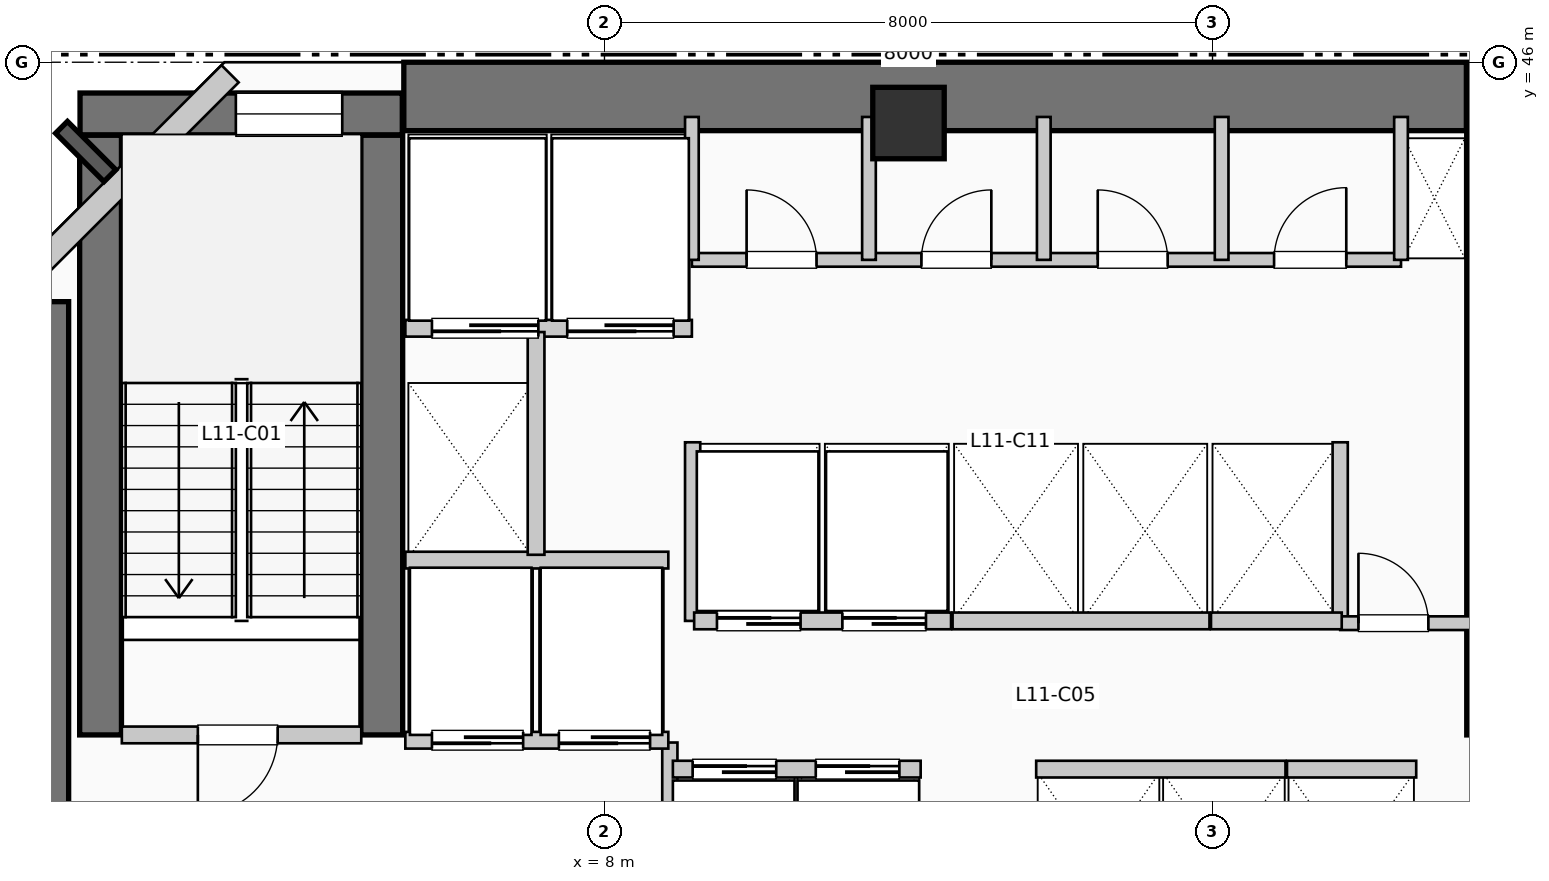
"""IFC4 building model, lengths in metres.
Left out: names, types, materials, properties, quantities, classifications, styles, units other than length and angle.
Written with IfcOpenShell. Run it as: python <this file> out.ifc"""

import sys

from ifc_helpers import new_model, si_unit, direction, frame, frame_2d, origin, origin_2d, place, context, subcontext, project, spatial, rectangle, extrude, element, fill, save


model = new_model("IFC4")
c1 = context("Model", 3, precision=1e-05, world=origin(), true_north=direction((0.0, 1.0)))
c2 = subcontext(c1, "Body", "Model", "MODEL_VIEW")
j1 = project(units=[si_unit("LENGTHUNIT", "METRE"), si_unit("PLANEANGLEUNIT", "RADIAN")], contexts=[c1])
p1 = place(None, origin())
s1 = spatial("IfcSite", under=j1, at=p1, CompositionType="ELEMENT")
p2 = place(p1, origin())
s2 = spatial("IfcBuilding", under=s1, at=p2, CompositionType="ELEMENT")
p3 = place(p2, frame((0.0, 0.0, 50.16)))
s3 = spatial("IfcBuildingStorey", under=s2, at=p3, CompositionType="ELEMENT", Elevation=50.16)
p4 = place(p3, frame((5.36, 45.55, 0.0), z_axis=(0.0, 0.0, 1.0), x_axis=(1.0, 0.0, 0.0)))
e1 = element("IfcWall", 1, at=p4, inside=s3, PredefinedType="SHEAR", context=c2, shape_type="SweptSolid", body=[
    extrude(rectangle(XDim=13.98, YDim=0.9, at=frame_2d((6.99, 0.0))), origin(), (0.0, 0.0, 1.0), 3.96),
])
p5 = place(p3, frame((0.5, 34.95, 0.0), z_axis=(0.0, 0.0, 1.0), x_axis=(0.0, 1.0, 0.0)))
e2 = element("IfcWall", 2, at=p5, inside=s3, PredefinedType="SHEAR", context=c2, shape_type="SweptSolid", body=[
    extrude(rectangle(XDim=7.9, YDim=0.9, at=frame_2d((3.95, 0.0))), origin(), (0.0, 0.0, 1.0), 3.96),
])
for number, where, z_axis, x_axis in (
    (3, (1.37, 37.15, 0.0), (0.0, 0.0, 1.0), (0.0, 1.0, 0.0)),
    (4, (5.07, 37.15, 0.0), (0.0, 0.0, 1.0), (0.0, 1.0, 0.0)),
):
    element("IfcWall", number, at=place(p3, frame(where, z_axis=z_axis, x_axis=x_axis)), inside=s3, PredefinedType="SHEAR", context=c2, shape_type="SweptSolid", body=[
        extrude(rectangle(XDim=7.89, YDim=0.55, at=frame_2d((3.945, 0.0))), origin(), (0.0, 0.0, 1.0), 3.96),
    ])
p6 = place(p3, frame((1.1, 45.32, 0.0), z_axis=(0.0, 0.0, 1.0), x_axis=(1.0, 0.0, 0.0)))
e5 = element("IfcWall", 5, at=p6, inside=s3, PredefinedType="SHEAR", context=c2, shape_type="SweptSolid", body=[
    extrude(rectangle(XDim=4.24, YDim=0.55, at=frame_2d((2.12, 0.0))), origin(), (0.0, 0.0, 1.0), 3.96),
])
p7 = place(p6, frame((2.05, 0.0, 1.05)))
e6 = element("IfcOpeningElement", 6, at=p7, cuts=e5, PredefinedType="OPENING", context=c2, shape_type="SweptSolid", body=[
    extrude(rectangle(XDim=1.4, YDim=1.8, at=frame_2d((0.7, 0.9))), frame((0.0, 0.285, 0.0), z_axis=(0.0, -1.0, 0.0), x_axis=(1.0, 0.0, 0.0)), (0.0, 0.0, 1.0), 0.57),
])
p8 = place(p3, frame((19.62, 37.15, 0.0), z_axis=(0.0, 0.0, 1.0), x_axis=(0.0, 1.0, 0.0)))
e7 = element("IfcWall", 7, at=p8, inside=s3, PredefinedType="SHEAR", context=c2, shape_type="SweptSolid", body=[
    extrude(rectangle(XDim=7.89, YDim=0.55, at=frame_2d((3.945, 0.0))), origin(), (0.0, 0.0, 1.0), 3.96),
])
p9 = place(p3, frame((19.35, 45.32, 0.0), z_axis=(0.0, 0.0, 1.0), x_axis=(1.0, 0.0, 0.0)))
e8 = element("IfcWall", 8, at=p9, inside=s3, PredefinedType="SHEAR", context=c2, shape_type="SweptSolid", body=[
    extrude(rectangle(XDim=3.69, YDim=0.55, at=frame_2d((1.845, 0.0))), origin(), (0.0, 0.0, 1.0), 3.96),
])
p10 = place(p9, frame((1.15, 0.0, 1.05)))
e9 = element("IfcOpeningElement", 9, at=p10, cuts=e8, PredefinedType="OPENING", context=c2, shape_type="SweptSolid", body=[
    extrude(rectangle(XDim=1.4, YDim=1.8, at=frame_2d((0.7, 0.9))), frame((0.0, 0.285, 0.0), z_axis=(0.0, -1.0, 0.0), x_axis=(1.0, 0.0, 0.0)), (0.0, 0.0, 1.0), 0.57),
])
p11 = place(p3, frame((12.0, 45.2, 0.0), z_axis=(0.0, 0.0, 1.0), x_axis=(1.0, 0.0, 0.0)))
e10 = element("IfcColumn", 10, at=p11, inside=s3, PredefinedType="COLUMN", context=c2, shape_type="SweptSolid", body=[
    extrude(rectangle(XDim=0.94, YDim=0.94, at=origin_2d()), origin(), (0.0, 0.0, 1.0), 3.96),
])
p12 = place(p3, frame((3.074, 45.848, 0.0), z_axis=(0.0, 0.0, 1.0), x_axis=(-0.707106781187, -0.707106781187, 0.0)))
e11 = element("IfcWall", 11, at=p12, inside=s3, PredefinedType="SOLIDWALL", context=c2, shape_type="SweptSolid", body=[
    extrude(rectangle(XDim=4.133, YDim=0.32, at=frame_2d((2.066, 0.0))), origin(), (0.0, 0.0, 1.0), 3.71),
])
p13 = place(p3, frame((1.65, 37.15, 0.0), z_axis=(0.0, 0.0, 1.0), x_axis=(1.0, 0.0, 0.0)))
e12 = element("IfcWall", 12, at=p13, inside=s3, PredefinedType="PARTITIONING", context=c2, shape_type="SweptSolid", body=[
    extrude(rectangle(XDim=3.15, YDim=0.22, at=frame_2d((1.575, 0.0))), origin(), (0.0, 0.0, 1.0), 3.71),
])
p14 = place(p13, frame((2.05, 0.0, 0.0), z_axis=(0.0, 0.0, 1.0), x_axis=(-1.0, 0.0, 0.0)))
e13 = element("IfcOpeningElement", 13, at=p14, cuts=e12, PredefinedType="OPENING", context=c2, shape_type="SweptSolid", body=[
    extrude(rectangle(XDim=1.05, YDim=2.15, at=frame_2d((0.525, 1.075))), frame((0.0, 0.12, 0.0), z_axis=(0.0, -1.0, 0.0), x_axis=(1.0, 0.0, 0.0)), (0.0, 0.0, 1.0), 0.24),
])
p15 = place(p3, frame((8.86, 34.55, 0.0), z_axis=(0.0, 0.0, 1.0), x_axis=(0.0, 1.0, 0.0)))
e14 = element("IfcWall", 14, at=p15, inside=s3, PredefinedType="PARTITIONING", context=c2, shape_type="SweptSolid", body=[
    extrude(rectangle(XDim=2.5, YDim=0.2, at=frame_2d((1.25, 0.0))), origin(), (0.0, 0.0, 1.0), 3.71),
])
p16 = place(p3, frame((5.38, 37.08, 0.0), z_axis=(0.0, 0.0, 1.0), x_axis=(1.0, 0.0, 0.0)))
e15 = element("IfcWall", 15, at=p16, inside=s3, PredefinedType="PARTITIONING", context=c2, shape_type="SweptSolid", body=[
    extrude(rectangle(XDim=3.46, YDim=0.22, at=frame_2d((1.73, 0.0))), origin(), (0.0, 0.0, 1.0), 3.71),
])
p17 = place(p16, frame((1.55, 0.0, 0.0), z_axis=(0.0, 0.0, 1.0), x_axis=(-1.0, 0.0, 0.0)))
e16 = element("IfcOpeningElement", 16, at=p17, cuts=e15, PredefinedType="OPENING", context=c2, shape_type="SweptSolid", body=[
    extrude(rectangle(XDim=1.2, YDim=2.2, at=frame_2d((0.6, 1.1))), frame((0.0, 0.12, 0.0), z_axis=(0.0, -1.0, 0.0), x_axis=(1.0, 0.0, 0.0)), (0.0, 0.0, 1.0), 0.24),
])
p18 = place(p16, frame((3.22, 0.0, 0.0), z_axis=(0.0, 0.0, 1.0), x_axis=(-1.0, 0.0, 0.0)))
e17 = element("IfcOpeningElement", 17, at=p18, cuts=e15, PredefinedType="OPENING", context=c2, shape_type="SweptSolid", body=[
    extrude(rectangle(XDim=1.2, YDim=2.2, at=frame_2d((0.6, 1.1))), frame((0.0, 0.12, 0.0), z_axis=(0.0, -1.0, 0.0), x_axis=(1.0, 0.0, 0.0)), (0.0, 0.0, 1.0), 0.24),
])
p19 = place(p3, frame((5.38, 39.45, 0.0), z_axis=(0.0, 0.0, 1.0), x_axis=(1.0, 0.0, 0.0)))
e18 = element("IfcWall", 18, at=p19, inside=s3, PredefinedType="PARTITIONING", context=c2, shape_type="SweptSolid", body=[
    extrude(rectangle(XDim=3.46, YDim=0.22, at=frame_2d((1.73, 0.0))), origin(), (0.0, 0.0, 1.0), 3.71),
])
p20 = place(p3, frame((5.38, 42.5, 0.0), z_axis=(0.0, 0.0, 1.0), x_axis=(1.0, 0.0, 0.0)))
e19 = element("IfcWall", 19, at=p20, inside=s3, PredefinedType="PARTITIONING", context=c2, shape_type="SweptSolid", body=[
    extrude(rectangle(XDim=3.77, YDim=0.22, at=frame_2d((1.885, 0.0))), origin(), (0.0, 0.0, 1.0), 3.71),
])
p21 = place(p20, frame((1.75, 0.0, 0.0), z_axis=(0.0, 0.0, 1.0), x_axis=(-1.0, 0.0, 0.0)))
e20 = element("IfcOpeningElement", 20, at=p21, cuts=e19, PredefinedType="OPENING", context=c2, shape_type="SweptSolid", body=[
    extrude(rectangle(XDim=1.4, YDim=2.2, at=frame_2d((0.7, 1.1))), frame((0.0, 0.12, 0.0), z_axis=(0.0, -1.0, 0.0), x_axis=(1.0, 0.0, 0.0)), (0.0, 0.0, 1.0), 0.24),
])
p22 = place(p20, frame((3.53, 0.0, 0.0), z_axis=(0.0, 0.0, 1.0), x_axis=(-1.0, 0.0, 0.0)))
e21 = element("IfcOpeningElement", 21, at=p22, cuts=e19, PredefinedType="OPENING", context=c2, shape_type="SweptSolid", body=[
    extrude(rectangle(XDim=1.4, YDim=2.2, at=frame_2d((0.7, 1.1))), frame((0.0, 0.12, 0.0), z_axis=(0.0, -1.0, 0.0), x_axis=(1.0, 0.0, 0.0)), (0.0, 0.0, 1.0), 0.24),
])
p23 = place(p3, frame((7.1, 39.52, 0.0), z_axis=(0.0, 0.0, 1.0), x_axis=(0.0, 1.0, 0.0)))
e22 = element("IfcWall", 22, at=p23, inside=s3, PredefinedType="PARTITIONING", context=c2, shape_type="SweptSolid", body=[
    extrude(rectangle(XDim=2.93, YDim=0.22, at=frame_2d((1.465, 0.0))), origin(), (0.0, 0.0, 1.0), 3.71),
])
for number, where, z_axis, x_axis in (
    (23, (9.16, 38.65, 0.0), (0.0, 0.0, 1.0), (0.0, 1.0, 0.0)),
    (24, (17.68, 38.65, 0.0), (0.0, 0.0, 1.0), (0.0, 1.0, 0.0)),
):
    element("IfcWall", number, at=place(p3, frame(where, z_axis=z_axis, x_axis=x_axis)), inside=s3, PredefinedType="PARTITIONING", context=c2, shape_type="SweptSolid", body=[
        extrude(rectangle(XDim=2.35, YDim=0.2, at=frame_2d((1.175, 0.0))), origin(), (0.0, 0.0, 1.0), 3.71),
    ])
p24 = place(p3, frame((17.68, 38.62, 0.0), z_axis=(0.0, 0.0, 1.0), x_axis=(1.0, 0.0, 0.0)))
e25 = element("IfcWall", 25, at=p24, inside=s3, PredefinedType="PARTITIONING", context=c2, shape_type="SweptSolid", body=[
    extrude(rectangle(XDim=1.84, YDim=0.18, at=frame_2d((0.92, 0.0))), origin(), (0.0, 0.0, 1.0), 3.71),
])
p25 = place(p24, frame((0.24, 0.0, 0.0)))
e26 = element("IfcOpeningElement", 26, at=p25, cuts=e25, PredefinedType="OPENING", context=c2, shape_type="SweptSolid", body=[
    extrude(rectangle(XDim=0.92, YDim=2.1, at=frame_2d((0.46, 1.05))), frame((0.0, 0.1, 0.0), z_axis=(0.0, -1.0, 0.0), x_axis=(1.0, 0.0, 0.0)), (0.0, 0.0, 1.0), 0.2),
])
p26 = place(p3, frame((8.9, 36.7, 0.0), z_axis=(0.0, 0.0, 1.0), x_axis=(1.0, 0.0, 0.0)))
e27 = element("IfcWall", 27, at=p26, inside=s3, PredefinedType="PARTITIONING", context=c2, shape_type="SweptSolid", body=[
    extrude(rectangle(XDim=3.26, YDim=0.22, at=frame_2d((1.63, 0.0))), origin(), (0.0, 0.0, 1.0), 3.71),
])
p27 = place(p26, frame((0.26, 0.0, 0.0)))
e28 = element("IfcOpeningElement", 28, at=p27, cuts=e27, PredefinedType="OPENING", context=c2, shape_type="SweptSolid", body=[
    extrude(rectangle(XDim=1.1, YDim=2.2, at=frame_2d((0.55, 1.1))), frame((0.0, 0.12, 0.0), z_axis=(0.0, -1.0, 0.0), x_axis=(1.0, 0.0, 0.0)), (0.0, 0.0, 1.0), 0.24),
])
p28 = place(p26, frame((1.88, 0.0, 0.0)))
e29 = element("IfcOpeningElement", 29, at=p28, cuts=e27, PredefinedType="OPENING", context=c2, shape_type="SweptSolid", body=[
    extrude(rectangle(XDim=1.1, YDim=2.2, at=frame_2d((0.55, 1.1))), frame((0.0, 0.12, 0.0), z_axis=(0.0, -1.0, 0.0), x_axis=(1.0, 0.0, 0.0)), (0.0, 0.0, 1.0), 0.24),
])
p29 = place(p3, frame((9.18, 38.65, 0.0), z_axis=(0.0, 0.0, 1.0), x_axis=(1.0, 0.0, 0.0)))
e30 = element("IfcWall", 30, at=p29, inside=s3, PredefinedType="PARTITIONING", context=c2, shape_type="SweptSolid", body=[
    extrude(rectangle(XDim=3.38, YDim=0.22, at=frame_2d((1.69, 0.0))), origin(), (0.0, 0.0, 1.0), 3.71),
])
p30 = place(p29, frame((0.3, 0.0, 0.0)))
e31 = element("IfcOpeningElement", 31, at=p30, cuts=e30, PredefinedType="OPENING", context=c2, shape_type="SweptSolid", body=[
    extrude(rectangle(XDim=1.1, YDim=2.2, at=frame_2d((0.55, 1.1))), frame((0.0, 0.12, 0.0), z_axis=(0.0, -1.0, 0.0), x_axis=(1.0, 0.0, 0.0)), (0.0, 0.0, 1.0), 0.24),
])
p31 = place(p29, frame((1.95, 0.0, 0.0)))
e32 = element("IfcOpeningElement", 32, at=p31, cuts=e30, PredefinedType="OPENING", context=c2, shape_type="SweptSolid", body=[
    extrude(rectangle(XDim=1.1, YDim=2.2, at=frame_2d((0.55, 1.1))), frame((0.0, 0.12, 0.0), z_axis=(0.0, -1.0, 0.0), x_axis=(1.0, 0.0, 0.0)), (0.0, 0.0, 1.0), 0.24),
])
p32 = place(p3, frame((13.68, 36.7, 0.0), z_axis=(0.0, 0.0, 1.0), x_axis=(1.0, 0.0, 0.0)))
e33 = element("IfcWall", 33, at=p32, inside=s3, PredefinedType="PARTITIONING", context=c2, shape_type="SweptSolid", body=[
    extrude(rectangle(XDim=3.28, YDim=0.22, at=frame_2d((1.64, 0.0))), origin(), (0.0, 0.0, 1.0), 3.71),
])
p33 = place(p3, frame((12.58, 38.65, 0.0), z_axis=(0.0, 0.0, 1.0), x_axis=(1.0, 0.0, 0.0)))
e34 = element("IfcWall", 34, at=p33, inside=s3, PredefinedType="PARTITIONING", context=c2, shape_type="SweptSolid", body=[
    extrude(rectangle(XDim=3.38, YDim=0.22, at=frame_2d((1.69, 0.0))), origin(), (0.0, 0.0, 1.0), 3.71),
])
p34 = place(p3, frame((16.98, 36.7, 0.0), z_axis=(0.0, 0.0, 1.0), x_axis=(1.0, 0.0, 0.0)))
e35 = element("IfcWall", 35, at=p34, inside=s3, PredefinedType="PARTITIONING", context=c2, shape_type="SweptSolid", body=[
    extrude(rectangle(XDim=1.7, YDim=0.22, at=frame_2d((0.85, 0.0))), origin(), (0.0, 0.0, 1.0), 3.71),
])
p35 = place(p3, frame((15.98, 38.65, 0.0), z_axis=(0.0, 0.0, 1.0), x_axis=(1.0, 0.0, 0.0)))
e36 = element("IfcWall", 36, at=p35, inside=s3, PredefinedType="PARTITIONING", context=c2, shape_type="SweptSolid", body=[
    extrude(rectangle(XDim=1.72, YDim=0.22, at=frame_2d((0.86, 0.0))), origin(), (0.0, 0.0, 1.0), 3.71),
])
p36 = place(p3, frame((9.15, 43.4, 0.0), z_axis=(0.0, 0.0, 1.0), x_axis=(1.0, 0.0, 0.0)))
e37 = element("IfcWall", 37, at=p36, inside=s3, PredefinedType="PLUMBINGWALL", context=c2, shape_type="SweptSolid", body=[
    extrude(rectangle(XDim=9.33, YDim=0.18, at=frame_2d((4.665, 0.0))), origin(), (0.0, 0.0, 1.0), 3.71),
])
p37 = place(p36, frame((0.72, 0.0, 0.0)))
e38 = element("IfcOpeningElement", 38, at=p37, cuts=e37, PredefinedType="OPENING", context=c2, shape_type="SweptSolid", body=[
    extrude(rectangle(XDim=0.92, YDim=2.1, at=frame_2d((0.46, 1.05))), frame((0.0, 0.1, 0.0), z_axis=(0.0, -1.0, 0.0), x_axis=(1.0, 0.0, 0.0)), (0.0, 0.0, 1.0), 0.2),
])
p38 = place(p36, frame((3.02, 0.0, 0.0)))
e39 = element("IfcOpeningElement", 39, at=p38, cuts=e37, PredefinedType="OPENING", context=c2, shape_type="SweptSolid", body=[
    extrude(rectangle(XDim=0.92, YDim=2.1, at=frame_2d((0.46, 1.05))), frame((0.0, 0.1, 0.0), z_axis=(0.0, -1.0, 0.0), x_axis=(1.0, 0.0, 0.0)), (0.0, 0.0, 1.0), 0.2),
])
p39 = place(p36, frame((5.34, 0.0, 0.0)))
e40 = element("IfcOpeningElement", 40, at=p39, cuts=e37, PredefinedType="OPENING", context=c2, shape_type="SweptSolid", body=[
    extrude(rectangle(XDim=0.92, YDim=2.1, at=frame_2d((0.46, 1.05))), frame((0.0, 0.1, 0.0), z_axis=(0.0, -1.0, 0.0), x_axis=(1.0, 0.0, 0.0)), (0.0, 0.0, 1.0), 0.2),
])
p40 = place(p36, frame((7.66, 0.0, 0.0)))
e41 = element("IfcOpeningElement", 41, at=p40, cuts=e37, PredefinedType="OPENING", context=c2, shape_type="SweptSolid", body=[
    extrude(rectangle(XDim=0.95, YDim=2.1, at=frame_2d((0.475, 1.05))), frame((0.0, 0.1, 0.0), z_axis=(0.0, -1.0, 0.0), x_axis=(1.0, 0.0, 0.0)), (0.0, 0.0, 1.0), 0.2),
])
for number, where, z_axis, x_axis in (
    (42, (9.15, 43.4, 0.0), (0.0, 0.0, 1.0), (0.0, 1.0, 0.0)),
    (43, (18.48, 43.4, 0.0), (0.0, 0.0, 1.0), (0.0, 1.0, 0.0)),
    (44, (11.48, 43.4, 0.0), (0.0, 0.0, 1.0), (0.0, 1.0, 0.0)),
    (45, (13.78, 43.4, 0.0), (0.0, 0.0, 1.0), (0.0, 1.0, 0.0)),
    (46, (16.12, 43.4, 0.0), (0.0, 0.0, 1.0), (0.0, 1.0, 0.0)),
):
    element("IfcWall", number, at=place(p3, frame(where, z_axis=z_axis, x_axis=x_axis)), inside=s3, PredefinedType="PLUMBINGWALL", context=c2, shape_type="SweptSolid", body=[
        extrude(rectangle(XDim=1.88, YDim=0.18, at=frame_2d((0.94, 0.0))), origin(), (0.0, 0.0, 1.0), 3.71),
    ])
p41 = place(p7, origin())
e47 = element("IfcWindow", 47, at=p41, inside=s3, PartitioningType="SINGLE_PANEL", PredefinedType="WINDOW", context=c2, shape_type="SweptSolid", body=[
    extrude(rectangle(XDim=1.4, YDim=1.8, at=frame_2d((0.7, 0.9))), frame((0.0, 0.03, 0.0), z_axis=(0.0, -1.0, 0.0), x_axis=(1.0, 0.0, 0.0)), (0.0, 0.0, 1.0), 0.06),
])
fill(e6, e47)
p42 = place(p14, origin())
e48 = element("IfcDoor", 48, at=p42, inside=s3, OperationType="SINGLE_SWING_LEFT", PredefinedType="DOOR", context=c2, shape_type="SweptSolid", body=[
    extrude(rectangle(XDim=1.05, YDim=2.15, at=frame_2d((0.525, 1.075))), frame((0.0, 0.025, 0.0), z_axis=(0.0, -1.0, 0.0), x_axis=(1.0, 0.0, 0.0)), (0.0, 0.0, 1.0), 0.05),
])
fill(e13, e48)
p43 = place(p17, origin())
e49 = element("IfcDoor", 49, at=p43, inside=s3, OperationType="SLIDING_TO_RIGHT", PredefinedType="DOOR", context=c2, shape_type="SweptSolid", body=[
    extrude(rectangle(XDim=1.2, YDim=2.2, at=frame_2d((0.6, 1.1))), frame((0.0, 0.025, 0.0), z_axis=(0.0, -1.0, 0.0), x_axis=(1.0, 0.0, 0.0)), (0.0, 0.0, 1.0), 0.05),
])
fill(e16, e49)
p44 = place(p18, origin())
e50 = element("IfcDoor", 50, at=p44, inside=s3, OperationType="SLIDING_TO_RIGHT", PredefinedType="DOOR", context=c2, shape_type="SweptSolid", body=[
    extrude(rectangle(XDim=1.2, YDim=2.2, at=frame_2d((0.6, 1.1))), frame((0.0, 0.025, 0.0), z_axis=(0.0, -1.0, 0.0), x_axis=(1.0, 0.0, 0.0)), (0.0, 0.0, 1.0), 0.05),
])
fill(e17, e50)
p45 = place(p21, origin())
e51 = element("IfcDoor", 51, at=p45, inside=s3, OperationType="SLIDING_TO_LEFT", PredefinedType="DOOR", context=c2, shape_type="SweptSolid", body=[
    extrude(rectangle(XDim=1.4, YDim=2.2, at=frame_2d((0.7, 1.1))), frame((0.0, 0.025, 0.0), z_axis=(0.0, -1.0, 0.0), x_axis=(1.0, 0.0, 0.0)), (0.0, 0.0, 1.0), 0.05),
])
fill(e20, e51)
p46 = place(p22, origin())
e52 = element("IfcDoor", 52, at=p46, inside=s3, OperationType="SLIDING_TO_LEFT", PredefinedType="DOOR", context=c2, shape_type="SweptSolid", body=[
    extrude(rectangle(XDim=1.4, YDim=2.2, at=frame_2d((0.7, 1.1))), frame((0.0, 0.025, 0.0), z_axis=(0.0, -1.0, 0.0), x_axis=(1.0, 0.0, 0.0)), (0.0, 0.0, 1.0), 0.05),
])
fill(e21, e52)
p47 = place(p25, origin())
e53 = element("IfcDoor", 53, at=p47, inside=s3, OperationType="SINGLE_SWING_LEFT", PredefinedType="DOOR", context=c2, shape_type="SweptSolid", body=[
    extrude(rectangle(XDim=0.92, YDim=2.1, at=frame_2d((0.46, 1.05))), frame((0.0, 0.025, 0.0), z_axis=(0.0, -1.0, 0.0), x_axis=(1.0, 0.0, 0.0)), (0.0, 0.0, 1.0), 0.05),
])
fill(e26, e53)
p48 = place(p27, origin())
e54 = element("IfcDoor", 54, at=p48, inside=s3, OperationType="SLIDING_TO_LEFT", PredefinedType="DOOR", context=c2, shape_type="SweptSolid", body=[
    extrude(rectangle(XDim=1.1, YDim=2.2, at=frame_2d((0.55, 1.1))), frame((0.0, 0.025, 0.0), z_axis=(0.0, -1.0, 0.0), x_axis=(1.0, 0.0, 0.0)), (0.0, 0.0, 1.0), 0.05),
])
fill(e28, e54)
p49 = place(p28, origin())
e55 = element("IfcDoor", 55, at=p49, inside=s3, OperationType="SLIDING_TO_LEFT", PredefinedType="DOOR", context=c2, shape_type="SweptSolid", body=[
    extrude(rectangle(XDim=1.1, YDim=2.2, at=frame_2d((0.55, 1.1))), frame((0.0, 0.025, 0.0), z_axis=(0.0, -1.0, 0.0), x_axis=(1.0, 0.0, 0.0)), (0.0, 0.0, 1.0), 0.05),
])
fill(e29, e55)
p50 = place(p30, origin())
e56 = element("IfcDoor", 56, at=p50, inside=s3, OperationType="SLIDING_TO_LEFT", PredefinedType="DOOR", context=c2, shape_type="SweptSolid", body=[
    extrude(rectangle(XDim=1.1, YDim=2.2, at=frame_2d((0.55, 1.1))), frame((0.0, 0.025, 0.0), z_axis=(0.0, -1.0, 0.0), x_axis=(1.0, 0.0, 0.0)), (0.0, 0.0, 1.0), 0.05),
])
fill(e31, e56)
p51 = place(p31, origin())
e57 = element("IfcDoor", 57, at=p51, inside=s3, OperationType="SLIDING_TO_LEFT", PredefinedType="DOOR", context=c2, shape_type="SweptSolid", body=[
    extrude(rectangle(XDim=1.1, YDim=2.2, at=frame_2d((0.55, 1.1))), frame((0.0, 0.025, 0.0), z_axis=(0.0, -1.0, 0.0), x_axis=(1.0, 0.0, 0.0)), (0.0, 0.0, 1.0), 0.05),
])
fill(e32, e57)
p52 = place(p37, origin())
e58 = element("IfcDoor", 58, at=p52, inside=s3, OperationType="SINGLE_SWING_LEFT", PredefinedType="DOOR", context=c2, shape_type="SweptSolid", body=[
    extrude(rectangle(XDim=0.92, YDim=2.1, at=frame_2d((0.46, 1.05))), frame((0.0, 0.025, 0.0), z_axis=(0.0, -1.0, 0.0), x_axis=(1.0, 0.0, 0.0)), (0.0, 0.0, 1.0), 0.05),
])
fill(e38, e58)
p53 = place(p38, origin())
e59 = element("IfcDoor", 59, at=p53, inside=s3, OperationType="SINGLE_SWING_RIGHT", PredefinedType="DOOR", context=c2, shape_type="SweptSolid", body=[
    extrude(rectangle(XDim=0.92, YDim=2.1, at=frame_2d((0.46, 1.05))), frame((0.0, 0.025, 0.0), z_axis=(0.0, -1.0, 0.0), x_axis=(1.0, 0.0, 0.0)), (0.0, 0.0, 1.0), 0.05),
])
fill(e39, e59)
p54 = place(p39, origin())
e60 = element("IfcDoor", 60, at=p54, inside=s3, OperationType="SINGLE_SWING_LEFT", PredefinedType="DOOR", context=c2, shape_type="SweptSolid", body=[
    extrude(rectangle(XDim=0.92, YDim=2.1, at=frame_2d((0.46, 1.05))), frame((0.0, 0.025, 0.0), z_axis=(0.0, -1.0, 0.0), x_axis=(1.0, 0.0, 0.0)), (0.0, 0.0, 1.0), 0.05),
])
fill(e40, e60)
p55 = place(p40, origin())
e61 = element("IfcDoor", 61, at=p55, inside=s3, OperationType="SINGLE_SWING_RIGHT", PredefinedType="DOOR", context=c2, shape_type="SweptSolid", body=[
    extrude(rectangle(XDim=0.95, YDim=2.1, at=frame_2d((0.475, 1.05))), frame((0.0, 0.025, 0.0), z_axis=(0.0, -1.0, 0.0), x_axis=(1.0, 0.0, 0.0)), (0.0, 0.0, 1.0), 0.05),
])
fill(e41, e61)
save(model, sys.argv[1])
